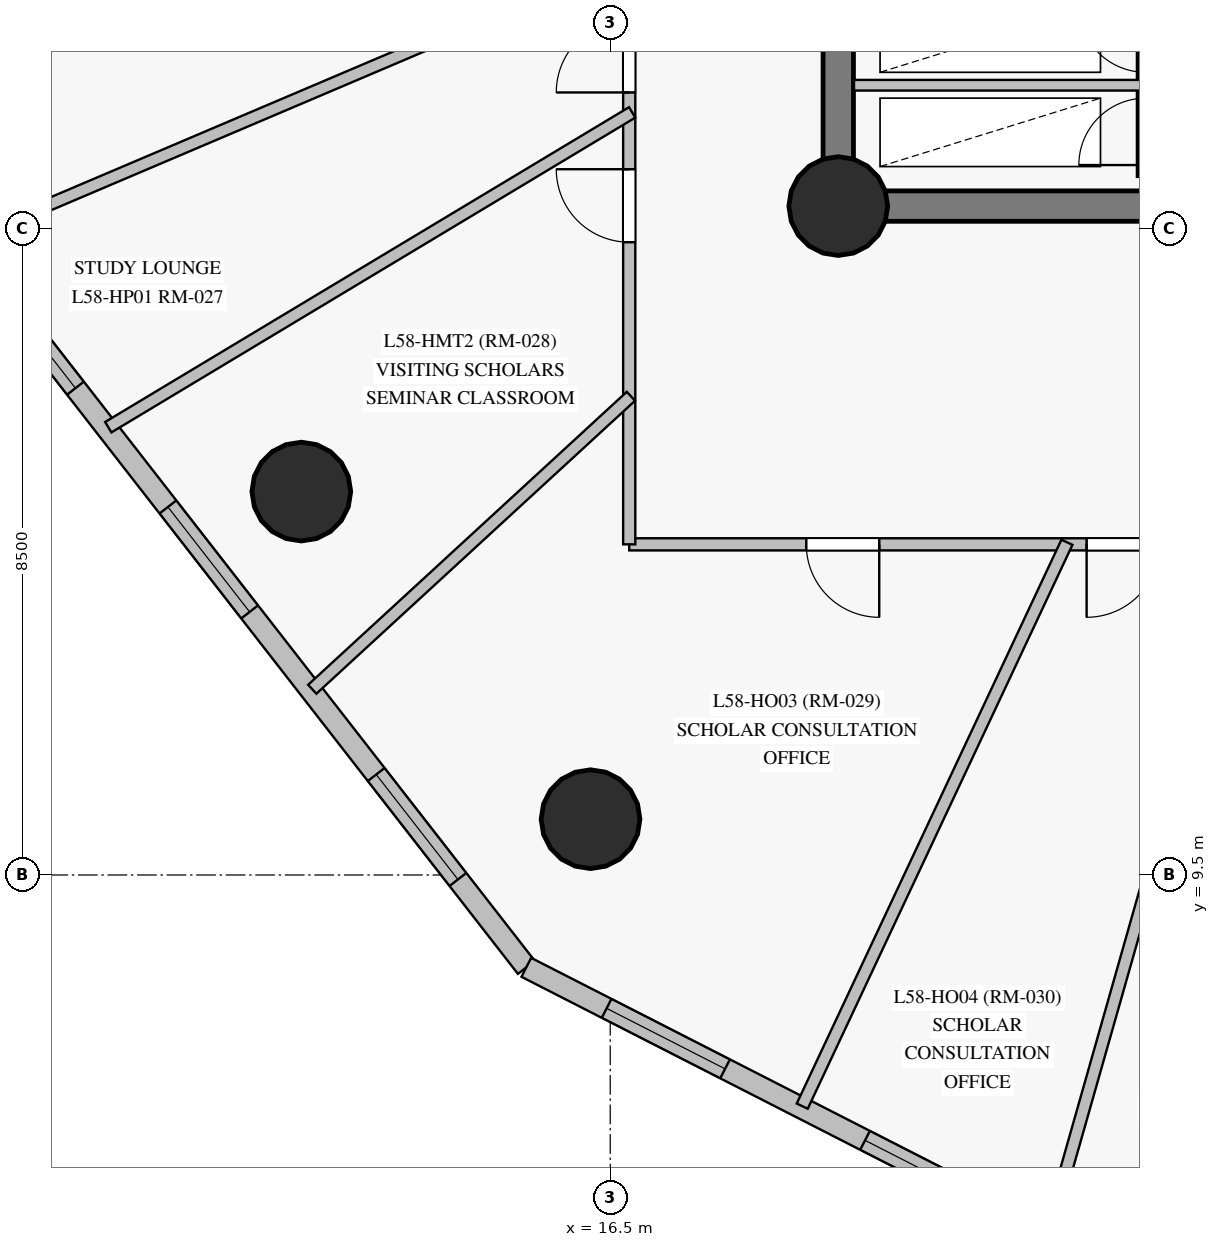
"""IFC4 building model, lengths in metres.
Left out: names, types, materials, properties, quantities, classifications, styles, units other than length and angle.
Written with IfcOpenShell. Run it as: python <this file> out.ifc"""

import sys

from ifc_helpers import new_model, si_unit, direction, frame, frame_2d, origin, origin_with_axes, origin_2d, place, context, subcontext, project, spatial, rectangle, circle, extrude, source, transform, mapped, element, fill, save


model = new_model("IFC4")
c1 = context("Model", 3, precision=1e-05, world=origin(), true_north=direction((0.0, 1.0)))
c2 = subcontext(c1, "Body", "Model", "MODEL_VIEW")
j1 = project(units=[si_unit("LENGTHUNIT", "METRE"), si_unit("PLANEANGLEUNIT", "RADIAN")], contexts=[c1])
p1 = place(None, origin())
s1 = spatial("IfcSite", under=j1, at=p1, CompositionType="ELEMENT")
p2 = place(p1, origin())
s2 = spatial("IfcBuilding", under=s1, at=p2, CompositionType="ELEMENT")
p3 = place(p2, frame((0.0, 0.0, 199.25)))
s3 = spatial("IfcBuildingStorey", under=s2, at=p3, CompositionType="ELEMENT", Elevation=199.25)
p4 = place(p3, frame((19.5, 18.3, 0.0), z_axis=(0.0, 0.0, 1.0), x_axis=(1.0, 0.0, 0.0)))
e1 = element("IfcWall", 1, at=p4, inside=s3, PredefinedType="SHEAR", context=c2, shape_type="SweptSolid", body=[
    extrude(rectangle(XDim=7.05, YDim=0.4, at=frame_2d((3.525, 0.0))), origin(), (0.0, 0.0, 1.0), 2.825),
])
p5 = place(p4, frame((4.2, 0.0, 0.0)))
e2 = element("IfcOpeningElement", 2, at=p5, cuts=e1, PredefinedType="OPENING", context=c2, shape_type="SweptSolid", body=[
    extrude(rectangle(XDim=1.4, YDim=2.2, at=frame_2d((0.7, 1.1))), frame((0.0, 0.21, 0.0), z_axis=(0.0, -1.0, 0.0), x_axis=(1.0, 0.0, 0.0)), (0.0, 0.0, 1.0), 0.42),
])
p6 = place(p3, frame((19.5, 34.7, 0.0), z_axis=(0.0, 0.0, 1.0), x_axis=(0.0, -1.0, 0.0)))
e3 = element("IfcWall", 3, at=p6, inside=s3, PredefinedType="SHEAR", context=c2, shape_type="SweptSolid", body=[
    extrude(rectangle(XDim=16.4, YDim=0.4, at=frame_2d((8.2, 0.0))), origin(), (0.0, 0.0, 1.0), 2.825),
])
p7 = place(p6, frame((3.24, 0.0, 0.0)))
e4 = element("IfcOpeningElement", 4, at=p7, cuts=e3, PredefinedType="OPENING", context=c2, shape_type="SweptSolid", body=[
    extrude(rectangle(XDim=1.1, YDim=2.15, at=frame_2d((0.55, 1.075))), frame((0.0, 0.21, 0.0), z_axis=(0.0, -1.0, 0.0), x_axis=(1.0, 0.0, 0.0)), (0.0, 0.0, 1.0), 0.42),
])
m1 = source(origin_with_axes(), c2, "Body", "SweptSolid", [
    extrude(circle(Radius=0.65, at=origin_2d()), origin(), (0.0, 0.0, 1.0), 3.05),
])
for number, where, z_axis, x_axis in (
    (5, (19.5, 18.3, 0.0), (0.0, 0.0, 1.0), (1.0, 0.0, 0.0)),
    (6, (12.436, 14.544, 0.0), (0.0, 0.0, 1.0), (1.0, 0.0, 0.0)),
    (7, (16.241, 10.234, 0.0), (0.0, 0.0, 1.0), (1.0, 0.0, 0.0)),
):
    element("IfcColumn", number, at=place(p3, frame(where, z_axis=z_axis, x_axis=x_axis)), inside=s3, PredefinedType="COLUMN", context=c2, shape_type="MappedRepresentation", body=[
        mapped(m1, transform((0.0, 0.0, 0.0), scale=1.0)),
    ])
p8 = place(p3, frame((6.906, 19.19, 0.0), z_axis=(0.0, 0.0, 1.0), x_axis=(0.614303780549, -0.789069619997, 0.0)))
e8 = element("IfcWall", 8, at=p8, inside=s3, PredefinedType="SOLIDWALL", context=c2, shape_type="SweptSolid", body=[
    extrude(rectangle(XDim=13.82, YDim=0.28, at=frame_2d((6.91, 0.0))), origin(), (0.0, 0.0, 1.0), 2.825),
])
p9 = place(p8, frame((2.414, 0.0, 0.85)))
e9 = element("IfcOpeningElement", 9, at=p9, cuts=e8, PredefinedType="OPENING", context=c2, shape_type="SweptSolid", body=[
    extrude(rectangle(XDim=1.75, YDim=1.65, at=frame_2d((0.875, 0.825))), frame((0.0, 0.15, 0.0), z_axis=(0.0, -1.0, 0.0), x_axis=(1.0, 0.0, 0.0)), (0.0, 0.0, 1.0), 0.3),
])
p10 = place(p8, frame((6.145, 0.0, 0.85)))
e10 = element("IfcOpeningElement", 10, at=p10, cuts=e8, PredefinedType="OPENING", context=c2, shape_type="SweptSolid", body=[
    extrude(rectangle(XDim=1.75, YDim=1.65, at=frame_2d((0.875, 0.825))), frame((0.0, 0.15, 0.0), z_axis=(0.0, -1.0, 0.0), x_axis=(1.0, 0.0, 0.0)), (0.0, 0.0, 1.0), 0.3),
])
p11 = place(p8, frame((10.605, 0.0, 0.85)))
e11 = element("IfcOpeningElement", 11, at=p11, cuts=e8, PredefinedType="OPENING", context=c2, shape_type="SweptSolid", body=[
    extrude(rectangle(XDim=1.75, YDim=1.65, at=frame_2d((0.875, 0.825))), frame((0.0, 0.15, 0.0), z_axis=(0.0, -1.0, 0.0), x_axis=(1.0, 0.0, 0.0)), (0.0, 0.0, 1.0), 0.3),
])
p12 = place(p3, frame((15.396, 8.285, 0.0), z_axis=(0.0, 0.0, 1.0), x_axis=(0.890555767274, -0.454874076394, 0.0)))
e12 = element("IfcWall", 12, at=p12, inside=s3, PredefinedType="SOLIDWALL", context=c2, shape_type="SweptSolid", body=[
    extrude(rectangle(XDim=10.075, YDim=0.28, at=frame_2d((5.037, 0.0))), origin(), (0.0, 0.0, 1.0), 2.825),
])
p13 = place(p12, frame((1.186, 0.0, 0.85)))
e13 = element("IfcOpeningElement", 13, at=p13, cuts=e12, PredefinedType="OPENING", context=c2, shape_type="SweptSolid", body=[
    extrude(rectangle(XDim=1.75, YDim=1.65, at=frame_2d((0.875, 0.825))), frame((0.0, 0.15, 0.0), z_axis=(0.0, -1.0, 0.0), x_axis=(1.0, 0.0, 0.0)), (0.0, 0.0, 1.0), 0.3),
])
p14 = place(p12, frame((5.004, 0.0, 0.85)))
e14 = element("IfcOpeningElement", 14, at=p14, cuts=e12, PredefinedType="OPENING", context=c2, shape_type="SweptSolid", body=[
    extrude(rectangle(XDim=1.75, YDim=1.65, at=frame_2d((0.875, 0.825))), frame((0.0, 0.15, 0.0), z_axis=(0.0, -1.0, 0.0), x_axis=(1.0, 0.0, 0.0)), (0.0, 0.0, 1.0), 0.3),
])
p15 = place(p12, frame((8.38, 0.0, 0.85)))
e15 = element("IfcOpeningElement", 15, at=p15, cuts=e12, PredefinedType="OPENING", context=c2, shape_type="SweptSolid", body=[
    extrude(rectangle(XDim=0.95, YDim=1.5, at=frame_2d((0.475, 0.75))), frame((0.0, 0.15, 0.0), z_axis=(0.0, -1.0, 0.0), x_axis=(1.0, 0.0, 0.0)), (0.0, 0.0, 1.0), 0.3),
])
p16 = place(p3, frame((23.545, 18.7, 0.0), z_axis=(0.0, 0.0, 1.0), x_axis=(0.0, 1.0, 0.0)))
e16 = element("IfcWall", 16, at=p16, inside=s3, PredefinedType="SHEAR", context=c2, shape_type="SweptSolid", body=[
    extrude(rectangle(XDim=15.6, YDim=0.2, at=frame_2d((7.8, 0.0))), origin(), (0.0, 0.0, 1.0), 2.825),
])
p17 = place(p16, frame((2.75, 0.0, 0.0)))
e17 = element("IfcOpeningElement", 17, at=p17, cuts=e16, PredefinedType="OPENING", context=c2, shape_type="SweptSolid", body=[
    extrude(rectangle(XDim=1.15, YDim=2.15, at=frame_2d((0.575, 1.075))), frame((0.0, 0.11, 0.0), z_axis=(0.0, -1.0, 0.0), x_axis=(1.0, 0.0, 0.0)), (0.0, 0.0, 1.0), 0.22),
])
p18 = place(p16, frame((0.14, 0.0, 0.0)))
e18 = element("IfcOpeningElement", 18, at=p18, cuts=e16, PredefinedType="OPENING", context=c2, shape_type="SweptSolid", body=[
    extrude(rectangle(XDim=0.88, YDim=2.1, at=frame_2d((0.44, 1.05))), frame((0.0, 0.11, 0.0), z_axis=(0.0, -1.0, 0.0), x_axis=(1.0, 0.0, 0.0)), (0.0, 0.0, 1.0), 0.22),
])
p19 = place(p16, frame((1.36, 0.0, 0.0)))
e19 = element("IfcOpeningElement", 19, at=p19, cuts=e16, PredefinedType="OPENING", context=c2, shape_type="SweptSolid", body=[
    extrude(rectangle(XDim=0.88, YDim=2.1, at=frame_2d((0.44, 1.05))), frame((0.0, 0.11, 0.0), z_axis=(0.0, -1.0, 0.0), x_axis=(1.0, 0.0, 0.0)), (0.0, 0.0, 1.0), 0.22),
])
p20 = place(p16, frame((12.1, 0.0, 0.0)))
e20 = element("IfcOpeningElement", 20, at=p20, cuts=e16, PredefinedType="OPENING", context=c2, shape_type="SweptSolid", body=[
    extrude(rectangle(XDim=1.12, YDim=2.15, at=frame_2d((0.56, 1.075))), frame((0.0, 0.11, 0.0), z_axis=(0.0, -1.0, 0.0), x_axis=(1.0, 0.0, 0.0)), (0.0, 0.0, 1.0), 0.22),
])
p21 = place(p16, frame((14.05, 0.0, 0.0)))
e21 = element("IfcOpeningElement", 21, at=p21, cuts=e16, PredefinedType="OPENING", context=c2, shape_type="SweptSolid", body=[
    extrude(rectangle(XDim=1.12, YDim=2.15, at=frame_2d((0.56, 1.075))), frame((0.0, 0.11, 0.0), z_axis=(0.0, -1.0, 0.0), x_axis=(1.0, 0.0, 0.0)), (0.0, 0.0, 1.0), 0.22),
])
p22 = place(p3, frame((41.8, 13.85, 0.0), z_axis=(0.0, 0.0, 1.0), x_axis=(-1.0, 0.0, 0.0)))
e22 = element("IfcWall", 22, at=p22, inside=s3, PredefinedType="PARTITIONING", context=c2, shape_type="SweptSolid", body=[
    extrude(rectangle(XDim=25.05, YDim=0.16, at=frame_2d((12.525, 0.0))), origin(), (0.0, 0.0, 1.0), 2.275),
])
p23 = place(p22, frame((1.812, 0.0, 0.0)))
e23 = element("IfcOpeningElement", 23, at=p23, cuts=e22, PredefinedType="OPENING", context=c2, shape_type="SweptSolid", body=[
    extrude(rectangle(XDim=0.96, YDim=2.15, at=frame_2d((0.48, 1.075))), frame((0.0, 0.09, 0.0), z_axis=(0.0, -1.0, 0.0), x_axis=(1.0, 0.0, 0.0)), (0.0, 0.0, 1.0), 0.18),
])
p24 = place(p22, frame((21.761, 0.0, 0.0)))
e24 = element("IfcOpeningElement", 24, at=p24, cuts=e22, PredefinedType="OPENING", context=c2, shape_type="SweptSolid", body=[
    extrude(rectangle(XDim=0.96, YDim=2.15, at=frame_2d((0.48, 1.075))), frame((0.0, 0.09, 0.0), z_axis=(0.0, -1.0, 0.0), x_axis=(1.0, 0.0, 0.0)), (0.0, 0.0, 1.0), 0.18),
])
p25 = place(p22, frame((18.073, 0.0, 0.0)))
e25 = element("IfcOpeningElement", 25, at=p25, cuts=e22, PredefinedType="OPENING", context=c2, shape_type="SweptSolid", body=[
    extrude(rectangle(XDim=0.96, YDim=2.15, at=frame_2d((0.48, 1.075))), frame((0.0, 0.09, 0.0), z_axis=(0.0, -1.0, 0.0), x_axis=(1.0, 0.0, 0.0)), (0.0, 0.0, 1.0), 0.18),
])
p26 = place(p22, frame((15.718, 0.0, 0.0)))
e26 = element("IfcOpeningElement", 26, at=p26, cuts=e22, PredefinedType="OPENING", context=c2, shape_type="SweptSolid", body=[
    extrude(rectangle(XDim=0.96, YDim=2.15, at=frame_2d((0.48, 1.075))), frame((0.0, 0.09, 0.0), z_axis=(0.0, -1.0, 0.0), x_axis=(1.0, 0.0, 0.0)), (0.0, 0.0, 1.0), 0.18),
])
p27 = place(p22, frame((12.05, 0.0, 0.0)))
e27 = element("IfcOpeningElement", 27, at=p27, cuts=e22, PredefinedType="OPENING", context=c2, shape_type="SweptSolid", body=[
    extrude(rectangle(XDim=0.96, YDim=2.15, at=frame_2d((0.48, 1.075))), frame((0.0, 0.09, 0.0), z_axis=(0.0, -1.0, 0.0), x_axis=(1.0, 0.0, 0.0)), (0.0, 0.0, 1.0), 0.18),
])
p28 = place(p22, frame((8.292, 0.0, 0.0)))
e28 = element("IfcOpeningElement", 28, at=p28, cuts=e22, PredefinedType="OPENING", context=c2, shape_type="SweptSolid", body=[
    extrude(rectangle(XDim=0.96, YDim=2.15, at=frame_2d((0.48, 1.075))), frame((0.0, 0.09, 0.0), z_axis=(0.0, -1.0, 0.0), x_axis=(1.0, 0.0, 0.0)), (0.0, 0.0, 1.0), 0.18),
])
p29 = place(p22, frame((5.788, 0.0, 0.0)))
e29 = element("IfcOpeningElement", 29, at=p29, cuts=e22, PredefinedType="OPENING", context=c2, shape_type="SweptSolid", body=[
    extrude(rectangle(XDim=0.96, YDim=2.15, at=frame_2d((0.48, 1.075))), frame((0.0, 0.09, 0.0), z_axis=(0.0, -1.0, 0.0), x_axis=(1.0, 0.0, 0.0)), (0.0, 0.0, 1.0), 0.18),
])
p30 = place(p3, frame((16.75, 13.85, 0.0), z_axis=(0.0, 0.0, 1.0), x_axis=(0.0, 1.0, 0.0)))
e30 = element("IfcWall", 30, at=p30, inside=s3, PredefinedType="PARTITIONING", context=c2, shape_type="SweptSolid", body=[
    extrude(rectangle(XDim=17.8, YDim=0.16, at=frame_2d((8.9, 0.0))), origin(), (0.0, 0.0, 1.0), 2.375),
])
p31 = place(p30, frame((11.685, 0.0, 0.0)))
e31 = element("IfcOpeningElement", 31, at=p31, cuts=e30, PredefinedType="OPENING", context=c2, shape_type="SweptSolid", body=[
    extrude(rectangle(XDim=0.96, YDim=2.15, at=frame_2d((0.48, 1.075))), frame((0.0, 0.09, 0.0), z_axis=(0.0, -1.0, 0.0), x_axis=(1.0, 0.0, 0.0)), (0.0, 0.0, 1.0), 0.18),
])
p32 = place(p30, frame((8.425, 0.0, 0.0)))
e32 = element("IfcOpeningElement", 32, at=p32, cuts=e30, PredefinedType="OPENING", context=c2, shape_type="SweptSolid", body=[
    extrude(rectangle(XDim=0.96, YDim=2.15, at=frame_2d((0.48, 1.075))), frame((0.0, 0.09, 0.0), z_axis=(0.0, -1.0, 0.0), x_axis=(1.0, 0.0, 0.0)), (0.0, 0.0, 1.0), 0.18),
])
p33 = place(p30, frame((5.945, 0.0, 0.0)))
e33 = element("IfcOpeningElement", 33, at=p33, cuts=e30, PredefinedType="OPENING", context=c2, shape_type="SweptSolid", body=[
    extrude(rectangle(XDim=0.96, YDim=2.15, at=frame_2d((0.48, 1.075))), frame((0.0, 0.09, 0.0), z_axis=(0.0, -1.0, 0.0), x_axis=(1.0, 0.0, 0.0)), (0.0, 0.0, 1.0), 0.18),
])
p34 = place(p30, frame((3.975, 0.0, 0.0)))
e34 = element("IfcOpeningElement", 34, at=p34, cuts=e30, PredefinedType="OPENING", context=c2, shape_type="SweptSolid", body=[
    extrude(rectangle(XDim=0.96, YDim=2.15, at=frame_2d((0.48, 1.075))), frame((0.0, 0.09, 0.0), z_axis=(0.0, -1.0, 0.0), x_axis=(1.0, 0.0, 0.0)), (0.0, 0.0, 1.0), 0.18),
])
p35 = place(p30, frame((15.741, 0.0, 0.0)))
e35 = element("IfcOpeningElement", 35, at=p35, cuts=e30, PredefinedType="OPENING", context=c2, shape_type="SweptSolid", body=[
    extrude(rectangle(XDim=0.86, YDim=2.04, at=frame_2d((0.43, 1.02))), frame((0.0, 0.09, 0.0), z_axis=(0.0, -1.0, 0.0), x_axis=(1.0, 0.0, 0.0)), (0.0, 0.0, 1.0), 0.18),
])
p36 = place(p3, frame((16.778, 21.579, 0.0), z_axis=(0.0, 0.0, 1.0), x_axis=(-0.920225962441, -0.391387503697, 0.0)))
e36 = element("IfcWall", 36, at=p36, inside=s3, PredefinedType="PARTITIONING", context=c2, shape_type="SweptSolid", body=[
    extrude(rectangle(XDim=9.549, YDim=0.16, at=frame_2d((4.774, 0.0))), origin(), (0.0, 0.0, 1.0), 2.825),
])
p37 = place(p3, frame((24.848, 13.879, 0.0), z_axis=(0.0, 0.0, 1.0), x_axis=(-0.273538310393, -0.961861108865, 0.0)))
e37 = element("IfcWall", 37, at=p37, inside=s3, PredefinedType="PARTITIONING", context=c2, shape_type="SweptSolid", body=[
    extrude(rectangle(XDim=9.434, YDim=0.16, at=frame_2d((4.717, 0.0))), origin(), (0.0, 0.0, 1.0), 2.825),
])
p38 = place(p3, frame((22.509, 13.877, 0.0), z_axis=(0.0, 0.0, 1.0), x_axis=(-0.424923080235, -0.905229460349, 0.0)))
e38 = element("IfcWall", 38, at=p38, inside=s3, PredefinedType="PARTITIONING", context=c2, shape_type="SweptSolid", body=[
    extrude(rectangle(XDim=8.195, YDim=0.16, at=frame_2d((4.097, 0.0))), origin(), (0.0, 0.0, 1.0), 2.825),
])
p39 = place(p3, frame((16.789, 19.532, 0.0), z_axis=(0.0, 0.0, 1.0), x_axis=(-0.857152504072, -0.515062699836, 0.0)))
e39 = element("IfcWall", 39, at=p39, inside=s3, PredefinedType="PARTITIONING", context=c2, shape_type="SweptSolid", body=[
    extrude(rectangle(XDim=8.041, YDim=0.16, at=frame_2d((4.021, 0.0))), origin(), (0.0, 0.0, 1.0), 2.825),
])
p40 = place(p3, frame((16.772, 15.798, 0.0), z_axis=(0.0, 0.0, 1.0), x_axis=(-0.736130064202, -0.676840105621, 0.0)))
e40 = element("IfcWall", 40, at=p40, inside=s3, PredefinedType="PARTITIONING", context=c2, shape_type="SweptSolid", body=[
    extrude(rectangle(XDim=5.695, YDim=0.16, at=frame_2d((2.847, 0.0))), origin(), (0.0, 0.0, 1.0), 2.825),
])
p41 = place(p3, frame((19.707, 19.89, 0.0), z_axis=(0.0, 0.0, 1.0), x_axis=(1.0, 0.0, 0.0)))
e41 = element("IfcWall", 41, at=p41, inside=s3, PredefinedType="PARTITIONING", context=c2, shape_type="SweptSolid", body=[
    extrude(rectangle(XDim=3.79, YDim=0.14, at=frame_2d((1.895, 0.0))), origin(), (0.0, 0.0, 1.0), 2.825),
])
m2 = source(origin_with_axes(), c2, "Body", "SweptSolid", [
    extrude(rectangle(XDim=1.75, YDim=1.65, at=frame_2d((0.875, 0.825))), frame((0.0, 0.03, 0.0), z_axis=(0.0, -1.0, 0.0), x_axis=(1.0, 0.0, 0.0)), (0.0, 0.0, 1.0), 0.06),
])
p42 = place(p9, origin())
e42 = element("IfcWindow", 42, at=p42, inside=s3, PartitioningType="SINGLE_PANEL", PredefinedType="WINDOW", context=c2, shape_type="MappedRepresentation", body=[
    mapped(m2, transform((0.0, 0.0, 0.0), scale=1.0)),
])
fill(e9, e42)
p43 = place(p10, origin())
e43 = element("IfcWindow", 43, at=p43, inside=s3, PartitioningType="SINGLE_PANEL", PredefinedType="WINDOW", context=c2, shape_type="MappedRepresentation", body=[
    mapped(m2, transform((0.0, 0.0, 0.0), scale=1.0)),
])
fill(e10, e43)
p44 = place(p11, origin())
e44 = element("IfcWindow", 44, at=p44, inside=s3, PartitioningType="SINGLE_PANEL", PredefinedType="WINDOW", context=c2, shape_type="MappedRepresentation", body=[
    mapped(m2, transform((0.0, 0.0, 0.0), scale=1.0)),
])
fill(e11, e44)
p45 = place(p13, origin())
e45 = element("IfcWindow", 45, at=p45, inside=s3, PartitioningType="SINGLE_PANEL", PredefinedType="WINDOW", context=c2, shape_type="MappedRepresentation", body=[
    mapped(m2, transform((0.0, 0.0, 0.0), scale=1.0)),
])
fill(e13, e45)
p46 = place(p14, origin())
e46 = element("IfcWindow", 46, at=p46, inside=s3, PartitioningType="SINGLE_PANEL", PredefinedType="WINDOW", context=c2, shape_type="MappedRepresentation", body=[
    mapped(m2, transform((0.0, 0.0, 0.0), scale=1.0)),
])
fill(e14, e46)
m3 = source(origin_with_axes(), c2, "Body", "SweptSolid", [
    extrude(rectangle(XDim=0.96, YDim=2.15, at=frame_2d((0.48, 1.075))), frame((0.0, 0.025, 0.0), z_axis=(0.0, -1.0, 0.0), x_axis=(1.0, 0.0, 0.0)), (0.0, 0.0, 1.0), 0.05),
])
p47 = place(p33, origin())
e47 = element("IfcDoor", 47, at=p47, inside=s3, OperationType="SINGLE_SWING_LEFT", PredefinedType="DOOR", context=c2, shape_type="MappedRepresentation", body=[
    mapped(m3, transform((0.0, 0.0, 0.0), scale=1.0)),
])
fill(e33, e47)
p48 = place(p34, origin())
e48 = element("IfcDoor", 48, at=p48, inside=s3, OperationType="SINGLE_SWING_RIGHT", PredefinedType="DOOR", context=c2, shape_type="MappedRepresentation", body=[
    mapped(m3, transform((0.0, 0.0, 0.0), scale=1.0)),
])
fill(e34, e48)
p49 = place(p24, origin())
e49 = element("IfcDoor", 49, at=p49, inside=s3, OperationType="SINGLE_SWING_LEFT", PredefinedType="DOOR", context=c2, shape_type="MappedRepresentation", body=[
    mapped(m3, transform((0.0, 0.0, 0.0), scale=1.0)),
])
fill(e24, e49)
p50 = place(p25, origin())
e50 = element("IfcDoor", 50, at=p50, inside=s3, OperationType="SINGLE_SWING_RIGHT", PredefinedType="DOOR", context=c2, shape_type="MappedRepresentation", body=[
    mapped(m3, transform((0.0, 0.0, 0.0), scale=1.0)),
])
fill(e25, e50)
save(model, sys.argv[1])
